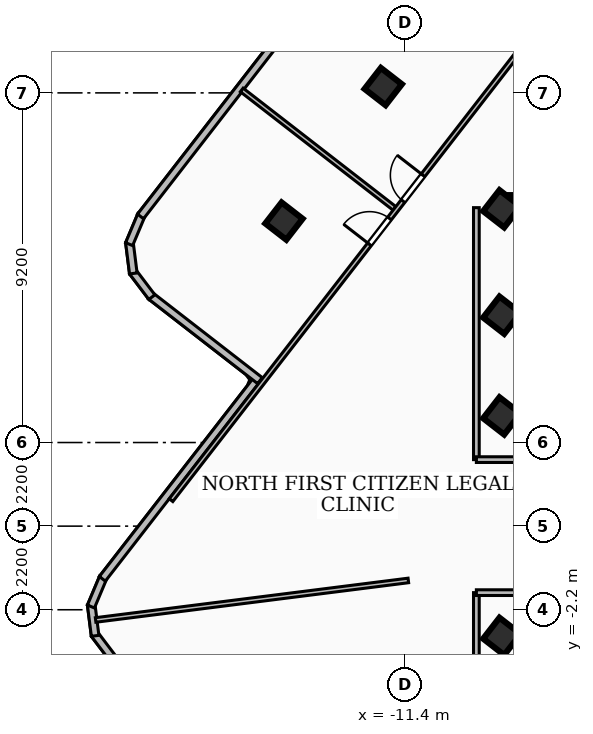
"""IFC4 building model, lengths in metres.
Left out: names, types, materials, properties, quantities, classifications, styles, units other than length and angle.
Written with IfcOpenShell. Run it as: python <this file> out.ifc"""

import sys

from ifc_helpers import new_model, si_unit, direction, frame, frame_2d, origin, origin_2d, place, context, subcontext, project, spatial, rectangle, extrude, element, fill, save


model = new_model("IFC4")
c1 = context("Model", 3, precision=1e-05, world=origin(), true_north=direction((0.0, 1.0)))
c2 = subcontext(c1, "Body", "Model", "MODEL_VIEW")
j1 = project(units=[si_unit("LENGTHUNIT", "METRE"), si_unit("PLANEANGLEUNIT", "RADIAN")], contexts=[c1])
p1 = place(None, origin())
s1 = spatial("IfcSite", under=j1, at=p1, CompositionType="ELEMENT")
p2 = place(p1, origin())
s2 = spatial("IfcBuilding", under=s1, at=p2, CompositionType="ELEMENT")
p3 = place(p2, frame((0.0, 0.0, 257.76)))
s3 = spatial("IfcBuildingStorey", under=s2, at=p3, CompositionType="ELEMENT", Elevation=257.76)
p4 = place(p3, frame((-8.78, 8.51, 0.0), z_axis=(0.0, 0.0, 1.0), x_axis=(1.0, 0.0, 0.0)))
e1 = element("IfcWall", 1, at=p4, inside=s3, PredefinedType="SHEAR", context=c2, shape_type="SweptSolid", body=[
    extrude(rectangle(XDim=17.56, YDim=0.4, at=frame_2d((8.78, 0.0))), origin(), (0.0, 0.0, 1.0), 3.16),
])
for number, where, z_axis, x_axis in (
    (2, (-8.85, -2.9, 0.0), (0.0, 0.0, 1.0), (0.613, 0.79, 0.0)),
    (3, (-8.85, 2.9, 0.0), (0.0, 0.0, 1.0), (0.613, 0.79, 0.0)),
    (4, (-8.85, 5.55, 0.0), (0.0, 0.0, 1.0), (0.613, 0.79, 0.0)),
    (5, (-8.85, 8.35, 0.0), (0.0, 0.0, 1.0), (0.613, 0.79, 0.0)),
    (6, (-11.971, 11.566, 0.0), (0.0, 0.0, 1.0), (0.613, 0.79, 0.0)),
    (7, (-14.583, 8.026, 0.0), (0.0, 0.0, 1.0), (0.613, 0.79, 0.0)),
):
    element("IfcColumn", number, at=place(p3, frame(where, z_axis=z_axis, x_axis=x_axis)), inside=s3, PredefinedType="COLUMN", context=c2, shape_type="SweptSolid", body=[
        extrude(rectangle(XDim=0.7, YDim=0.7, at=origin_2d()), origin(), (0.0, 0.0, 1.0), 3.42),
    ])
p5 = place(p3, frame((-19.064, -3.509, 0.0), z_axis=(0.0, 0.0, 1.0), x_axis=(-0.603908166539, 0.797053904317, 0.0)))
e8 = element("IfcWall", 8, at=p5, inside=s3, PredefinedType="SOLIDWALL", context=c2, shape_type="SweptSolid", body=[
    extrude(rectangle(XDim=0.838, YDim=0.2, at=frame_2d((0.419, 0.0))), origin(), (0.0, 0.0, 1.0), 3.16),
])
p6 = place(p3, frame((-19.552, -2.886, 0.0), z_axis=(0.0, 0.0, 1.0), x_axis=(-0.124799052175, 0.992182038023, 0.0)))
e9 = element("IfcWall", 9, at=p6, inside=s3, PredefinedType="SOLIDWALL", context=c2, shape_type="SweptSolid", body=[
    extrude(rectangle(XDim=0.825, YDim=0.2, at=frame_2d((0.413, 0.0))), origin(), (0.0, 0.0, 1.0), 3.16),
])
p7 = place(p3, frame((-19.662, -2.115, 0.0), z_axis=(0.0, 0.0, 1.0), x_axis=(0.388213349612, 0.921569528133, 0.0)))
e10 = element("IfcWall", 10, at=p7, inside=s3, PredefinedType="SOLIDWALL", context=c2, shape_type="SweptSolid", body=[
    extrude(rectangle(XDim=0.838, YDim=0.2, at=frame_2d((0.419, 0.0))), origin(), (0.0, 0.0, 1.0), 3.16),
])
p8 = place(p3, frame((-19.362, -1.386, 0.0), z_axis=(0.0, 0.0, 1.0), x_axis=(0.613007625303, 0.790076990755, 0.0)))
e11 = element("IfcWall", 11, at=p8, inside=s3, PredefinedType="SOLIDWALL", context=c2, shape_type="SweptSolid", body=[
    extrude(rectangle(XDim=6.742, YDim=0.2, at=frame_2d((3.371, 0.0))), origin(), (0.0, 0.0, 1.0), 3.16),
])
p9 = place(p3, frame((-15.215, 3.829, 0.0), z_axis=(0.0, 0.0, 1.0), x_axis=(-0.790311198889, 0.612705646221, 0.0)))
e12 = element("IfcWall", 12, at=p9, inside=s3, PredefinedType="SOLIDWALL", context=c2, shape_type="SweptSolid", body=[
    extrude(rectangle(XDim=3.643, YDim=0.2, at=frame_2d((1.821, 0.0))), origin(), (0.0, 0.0, 1.0), 3.16),
])
p10 = place(p3, frame((-18.059, 6.026, 0.0), z_axis=(0.0, 0.0, 1.0), x_axis=(-0.603582833373, 0.797300296787, 0.0)))
e13 = element("IfcWall", 13, at=p10, inside=s3, PredefinedType="SOLIDWALL", context=c2, shape_type="SweptSolid", body=[
    extrude(rectangle(XDim=0.838, YDim=0.2, at=frame_2d((0.419, 0.0))), origin(), (0.0, 0.0, 1.0), 3.16),
])
p11 = place(p3, frame((-18.547, 6.649, 0.0), z_axis=(0.0, 0.0, 1.0), x_axis=(-0.124507909692, 0.992218615238, 0.0)))
e14 = element("IfcWall", 14, at=p11, inside=s3, PredefinedType="SOLIDWALL", context=c2, shape_type="SweptSolid", body=[
    extrude(rectangle(XDim=0.825, YDim=0.2, at=frame_2d((0.413, 0.0))), origin(), (0.0, 0.0, 1.0), 3.16),
])
p12 = place(p3, frame((-18.657, 7.42, 0.0), z_axis=(0.0, 0.0, 1.0), x_axis=(0.387965780676, 0.921673777985, 0.0)))
e15 = element("IfcWall", 15, at=p12, inside=s3, PredefinedType="SOLIDWALL", context=c2, shape_type="SweptSolid", body=[
    extrude(rectangle(XDim=0.838, YDim=0.2, at=frame_2d((0.419, 0.0))), origin(), (0.0, 0.0, 1.0), 3.16),
])
p13 = place(p3, frame((-18.357, 8.149, 0.0), z_axis=(0.0, 0.0, 1.0), x_axis=(0.612797548915, 0.790239940806, 0.0)))
e16 = element("IfcWall", 16, at=p13, inside=s3, PredefinedType="SOLIDWALL", context=c2, shape_type="SweptSolid", body=[
    extrude(rectangle(XDim=9.824, YDim=0.2, at=frame_2d((4.912, 0.0))), origin(), (0.0, 0.0, 1.0), 3.16),
])
p14 = place(p13, frame((6.462, 0.0, 0.85)))
e17 = element("IfcOpeningElement", 17, at=p14, cuts=e16, PredefinedType="OPENING", context=c2, shape_type="SweptSolid", body=[
    extrude(rectangle(XDim=2.4, YDim=2.1, at=frame_2d((1.2, 1.05))), frame((0.0, 0.11, 0.0), z_axis=(0.0, -1.0, 0.0), x_axis=(1.0, 0.0, 0.0)), (0.0, 0.0, 1.0), 0.22),
])
p15 = place(p3, frame((-9.52, 1.75, 0.0), z_axis=(0.0, 0.0, 1.0), x_axis=(0.0, 1.0, 0.0)))
e18 = element("IfcWall", 18, at=p15, inside=s3, PredefinedType="PARTITIONING", context=c2, shape_type="SweptSolid", body=[
    extrude(rectangle(XDim=6.63, YDim=0.15, at=frame_2d((3.315, 0.0))), origin(), (0.0, 0.0, 1.0), 2.53),
])
p16 = place(p3, frame((-7.85, 1.75, 0.0), z_axis=(0.0, 0.0, 1.0), x_axis=(-1.0, 0.0, 0.0)))
e19 = element("IfcWall", 19, at=p16, inside=s3, PredefinedType="PARTITIONING", context=c2, shape_type="SweptSolid", body=[
    extrude(rectangle(XDim=1.67, YDim=0.15, at=frame_2d((0.835, 0.0))), origin(), (0.0, 0.0, 1.0), 2.39),
])
p17 = place(p3, frame((-9.52, -8.38, 0.0), z_axis=(0.0, 0.0, 1.0), x_axis=(0.0, 1.0, 0.0)))
e20 = element("IfcWall", 20, at=p17, inside=s3, PredefinedType="PARTITIONING", context=c2, shape_type="SweptSolid", body=[
    extrude(rectangle(XDim=6.63, YDim=0.15, at=frame_2d((3.315, 0.0))), origin(), (0.0, 0.0, 1.0), 3.16),
])
p18 = place(p3, frame((-7.85, -1.75, 0.0), z_axis=(0.0, 0.0, 1.0), x_axis=(-1.0, 0.0, 0.0)))
e21 = element("IfcWall", 21, at=p18, inside=s3, PredefinedType="PARTITIONING", context=c2, shape_type="SweptSolid", body=[
    extrude(rectangle(XDim=1.67, YDim=0.15, at=frame_2d((0.835, 0.0))), origin(), (0.0, 0.0, 1.0), 2.39),
])
p19 = place(p3, frame((-11.31, -1.429, 0.0), z_axis=(0.0, 0.0, 1.0), x_axis=(-0.992107592132, -0.125389495712, 0.0)))
e22 = element("IfcWall", 22, at=p19, inside=s3, PredefinedType="PARTITIONING", context=c2, shape_type="SweptSolid", body=[
    extrude(rectangle(XDim=8.294, YDim=0.12, at=frame_2d((4.147, 0.0))), origin(), (0.0, 0.0, 1.0), 3.16),
])
p20 = place(p3, frame((-11.676, 8.361, 0.0), z_axis=(0.0, 0.0, 1.0), x_axis=(-0.790227868115, 0.612813117071, 0.0)))
e23 = element("IfcWall", 23, at=p20, inside=s3, PredefinedType="PARTITIONING", context=c2, shape_type="SweptSolid", body=[
    extrude(rectangle(XDim=5.085, YDim=0.12, at=frame_2d((2.542, 0.0))), origin(), (0.0, 0.0, 1.0), 3.16),
])
p21 = place(p3, frame((-17.555, 0.683, 0.0), z_axis=(0.0, 0.0, 1.0), x_axis=(0.61291959311, 0.790145285617, 0.0)))
e24 = element("IfcWall", 24, at=p21, inside=s3, PredefinedType="PARTITIONING", context=c2, shape_type="SweptSolid", body=[
    extrude(rectangle(XDim=20.239, YDim=0.12, at=frame_2d((10.12, 0.0))), origin(), (0.0, 0.0, 1.0), 2.53),
])
p22 = place(p21, frame((9.96, 0.0, 0.0)))
e25 = element("IfcOpeningElement", 25, at=p22, cuts=e24, PredefinedType="OPENING", context=c2, shape_type="SweptSolid", body=[
    extrude(rectangle(XDim=0.86, YDim=2.04, at=frame_2d((0.43, 1.02))), frame((0.0, 0.07, 0.0), z_axis=(0.0, -1.0, 0.0), x_axis=(1.0, 0.0, 0.0)), (0.0, 0.0, 1.0), 0.14),
])
p23 = place(p21, frame((8.52, 0.0, 0.0)))
e26 = element("IfcOpeningElement", 26, at=p23, cuts=e24, PredefinedType="OPENING", context=c2, shape_type="SweptSolid", body=[
    extrude(rectangle(XDim=0.86, YDim=2.04, at=frame_2d((0.43, 1.02))), frame((0.0, 0.07, 0.0), z_axis=(0.0, -1.0, 0.0), x_axis=(1.0, 0.0, 0.0)), (0.0, 0.0, 1.0), 0.14),
])
p24 = place(p22, origin())
e27 = element("IfcDoor", 27, at=p24, inside=s3, OperationType="SINGLE_SWING_RIGHT", PredefinedType="DOOR", context=c2, shape_type="SweptSolid", body=[
    extrude(rectangle(XDim=0.86, YDim=2.04, at=frame_2d((0.43, 1.02))), frame((0.0, 0.025, 0.0), z_axis=(0.0, -1.0, 0.0), x_axis=(1.0, 0.0, 0.0)), (0.0, 0.0, 1.0), 0.05),
])
fill(e25, e27)
p25 = place(p23, origin())
e28 = element("IfcDoor", 28, at=p25, inside=s3, OperationType="SINGLE_SWING_LEFT", PredefinedType="DOOR", context=c2, shape_type="SweptSolid", body=[
    extrude(rectangle(XDim=0.86, YDim=2.04, at=frame_2d((0.43, 1.02))), frame((0.0, 0.025, 0.0), z_axis=(0.0, -1.0, 0.0), x_axis=(1.0, 0.0, 0.0)), (0.0, 0.0, 1.0), 0.05),
])
fill(e26, e28)
save(model, sys.argv[1])
